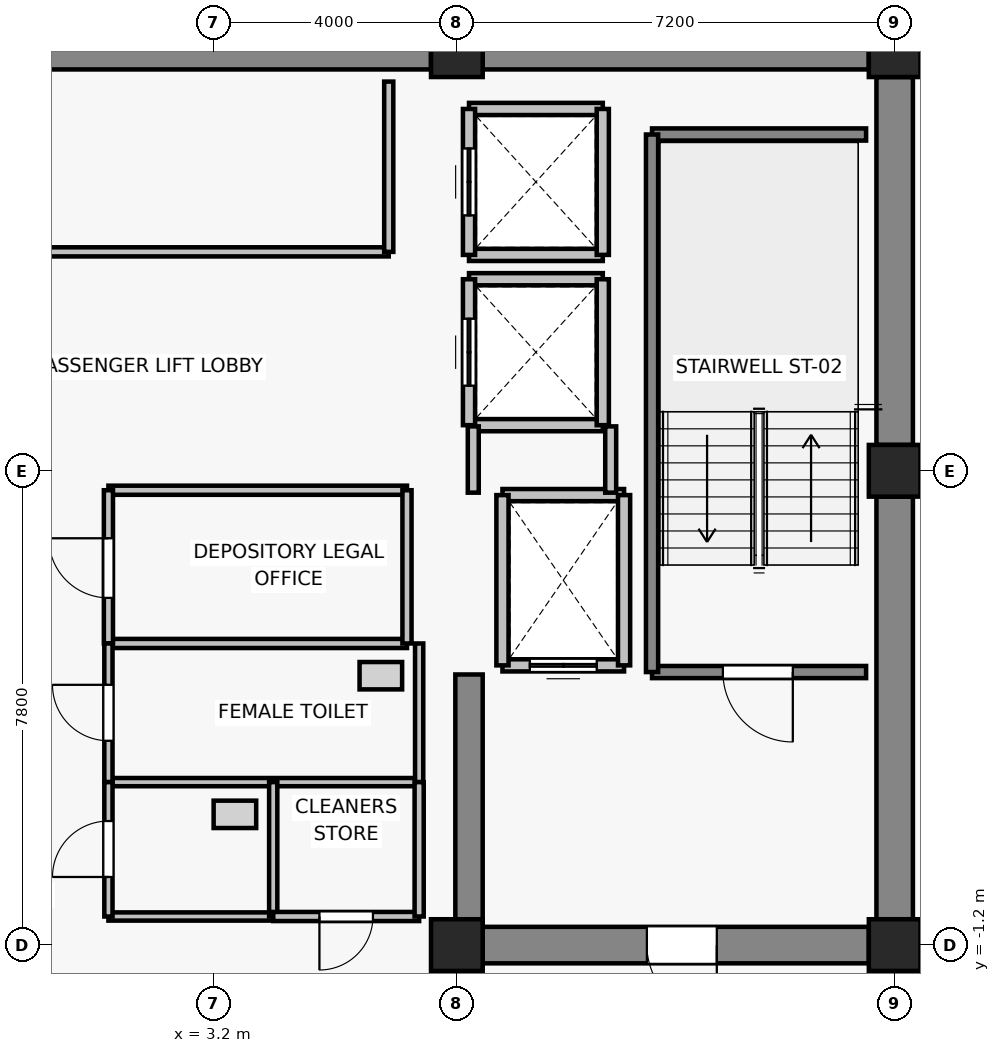
"""IFC4 building model, lengths in metres.
Left out: names, types, materials, properties, quantities, classifications, styles, units other than length and angle.
Written with IfcOpenShell. Run it as: python <this file> out.ifc"""

import sys

from ifc_helpers import new_model, si_unit, direction, frame, frame_2d, origin, origin_2d, place, context, subcontext, project, spatial, rectangle, extrude, source, transform, mapped, element, fill, save


model = new_model("IFC4")
c1 = context("Model", 3, precision=1e-05, world=origin(), true_north=direction((0.0, 1.0)))
c2 = subcontext(c1, "Body", "Model", "MODEL_VIEW")
j1 = project(units=[si_unit("LENGTHUNIT", "METRE"), si_unit("PLANEANGLEUNIT", "RADIAN")], contexts=[c1])
p1 = place(None, origin())
s1 = spatial("IfcSite", under=j1, at=p1, CompositionType="ELEMENT")
p2 = place(p1, origin())
s2 = spatial("IfcBuilding", under=s1, at=p2, CompositionType="ELEMENT")
p3 = place(p2, frame((0.0, 0.0, 255.1)))
s3 = spatial("IfcBuildingStorey", under=s2, at=p3, CompositionType="ELEMENT", Elevation=255.1)
for number, where, z_axis, x_axis in (
    (1, (7.2, -1.2, 0.0), (0.0, 0.0, 1.0), (1.0, 0.0, 0.0)),
    (2, (14.4, -1.2, 0.0), (0.0, 0.0, 1.0), (1.0, 0.0, 0.0)),
    (3, (14.4, 6.6, 0.0), (0.0, 0.0, 1.0), (1.0, 0.0, 0.0)),
    (4, (7.2, 13.5, 0.0), (0.0, 0.0, 1.0), (1.0, 0.0, 0.0)),
    (5, (14.4, 13.5, 0.0), (0.0, 0.0, 1.0), (1.0, 0.0, 0.0)),
):
    element("IfcColumn", number, at=place(p3, frame(where, z_axis=z_axis, x_axis=x_axis)), inside=s3, PredefinedType="COLUMN", context=c2, shape_type="SweptSolid", body=[
        extrude(rectangle(XDim=0.85, YDim=0.85, at=origin_2d()), origin(), (0.0, 0.0, 1.0), 3.3),
    ])
p4 = place(p3, frame((-6.775, 13.5, 0.0), z_axis=(0.0, 0.0, 1.0), x_axis=(1.0, 0.0, 0.0)))
e6 = element("IfcWall", 6, at=p4, inside=s3, PredefinedType="SHEAR", context=c2, shape_type="SweptSolid", body=[
    extrude(rectangle(XDim=13.55, YDim=0.6, at=frame_2d((6.775, 0.0))), origin(), (0.0, 0.0, 1.0), 3.075),
])
p5 = place(p3, frame((7.625, 13.5, 0.0), z_axis=(0.0, 0.0, 1.0), x_axis=(1.0, 0.0, 0.0)))
e7 = element("IfcWall", 7, at=p5, inside=s3, PredefinedType="SHEAR", context=c2, shape_type="SweptSolid", body=[
    extrude(rectangle(XDim=6.35, YDim=0.6, at=frame_2d((3.175, 0.0))), origin(), (0.0, 0.0, 1.0), 3.075),
])
p6 = place(p3, frame((14.4, -0.775, 0.0), z_axis=(0.0, 0.0, 1.0), x_axis=(0.0, 1.0, 0.0)))
e8 = element("IfcWall", 8, at=p6, inside=s3, PredefinedType="SHEAR", context=c2, shape_type="SweptSolid", body=[
    extrude(rectangle(XDim=6.95, YDim=0.6, at=frame_2d((3.475, 0.0))), origin(), (0.0, 0.0, 1.0), 3.075),
])
p7 = place(p3, frame((14.4, 7.025, 0.0), z_axis=(0.0, 0.0, 1.0), x_axis=(0.0, 1.0, 0.0)))
e9 = element("IfcWall", 9, at=p7, inside=s3, PredefinedType="SHEAR", context=c2, shape_type="SweptSolid", body=[
    extrude(rectangle(XDim=6.05, YDim=0.6, at=frame_2d((3.025, 0.0))), origin(), (0.0, 0.0, 1.0), 3.075),
])
p8 = place(p3, frame((13.975, -1.2, 0.0), z_axis=(0.0, 0.0, 1.0), x_axis=(-1.0, 0.0, 0.0)))
e10 = element("IfcWall", 10, at=p8, inside=s3, PredefinedType="SHEAR", context=c2, shape_type="SweptSolid", body=[
    extrude(rectangle(XDim=6.35, YDim=0.6, at=frame_2d((3.175, 0.0))), origin(), (0.0, 0.0, 1.0), 3.075),
])
p9 = place(p8, frame((2.5, 0.0, 0.0)))
e11 = element("IfcOpeningElement", 11, at=p9, cuts=e10, PredefinedType="OPENING", context=c2, shape_type="SweptSolid", body=[
    extrude(rectangle(XDim=1.15, YDim=2.15, at=frame_2d((0.575, 1.075))), frame((0.0, 0.31, 0.0), z_axis=(0.0, -1.0, 0.0), x_axis=(1.0, 0.0, 0.0)), (0.0, 0.0, 1.0), 0.62),
])
p10 = place(p3, frame((7.4, -0.9, 0.0), z_axis=(0.0, 0.0, 1.0), x_axis=(0.0, 1.0, 0.0)))
e12 = element("IfcWall", 12, at=p10, inside=s3, PredefinedType="SHEAR", context=c2, shape_type="SweptSolid", body=[
    extrude(rectangle(XDim=4.15, YDim=0.45, at=frame_2d((2.075, 0.0))), origin(), (0.0, 0.0, 1.0), 3.075),
])
p11 = place(p3, frame((9.95, 3.4, 0.0), z_axis=(0.0, 0.0, 1.0), x_axis=(-1.0, 0.0, 0.0)))
e13 = element("IfcWall", 13, at=p11, inside=s3, PredefinedType="SOLIDWALL", context=c2, shape_type="SweptSolid", body=[
    extrude(rectangle(XDim=2.0, YDim=0.2, at=frame_2d((1.0, 0.0))), origin(), (0.0, 0.0, 1.0), 3.075),
])
p12 = place(p11, frame((0.45, 0.0, 0.0)))
e14 = element("IfcOpeningElement", 14, at=p12, cuts=e13, PredefinedType="OPENING", context=c2, shape_type="SweptSolid", body=[
    extrude(rectangle(XDim=1.1, YDim=2.2, at=frame_2d((0.55, 1.1))), frame((0.0, 0.11, 0.0), z_axis=(0.0, -1.0, 0.0), x_axis=(1.0, 0.0, 0.0)), (0.0, 0.0, 1.0), 0.22),
])
p13 = place(p3, frame((7.95, 6.2, 0.0), z_axis=(0.0, 0.0, 1.0), x_axis=(1.0, 0.0, 0.0)))
e15 = element("IfcWall", 15, at=p13, inside=s3, PredefinedType="SOLIDWALL", context=c2, shape_type="SweptSolid", body=[
    extrude(rectangle(XDim=2.0, YDim=0.2, at=frame_2d((1.0, 0.0))), origin(), (0.0, 0.0, 1.0), 3.075),
])
for number, where, z_axis, x_axis in (
    (16, (7.95, 3.4, 0.0), (0.0, 0.0, 1.0), (0.0, 1.0, 0.0)),
    (17, (9.95, 6.2, 0.0), (0.0, 0.0, 1.0), (0.0, -1.0, 0.0)),
):
    element("IfcWall", number, at=place(p3, frame(where, z_axis=z_axis, x_axis=x_axis)), inside=s3, PredefinedType="SOLIDWALL", context=c2, shape_type="SweptSolid", body=[
        extrude(rectangle(XDim=2.8, YDim=0.2, at=frame_2d((1.4, 0.0))), origin(), (0.0, 0.0, 1.0), 3.075),
    ])
for number, where, z_axis, x_axis in (
    (18, (9.6, 7.35, 0.0), (0.0, 0.0, 1.0), (-1.0, 0.0, 0.0)),
    (19, (7.4, 9.75, 0.0), (0.0, 0.0, 1.0), (1.0, 0.0, 0.0)),
):
    element("IfcWall", number, at=place(p3, frame(where, z_axis=z_axis, x_axis=x_axis)), inside=s3, PredefinedType="SOLIDWALL", context=c2, shape_type="SweptSolid", body=[
        extrude(rectangle(XDim=2.2, YDim=0.2, at=frame_2d((1.1, 0.0))), origin(), (0.0, 0.0, 1.0), 2.615),
    ])
p14 = place(p3, frame((7.4, 7.35, 0.0), z_axis=(0.0, 0.0, 1.0), x_axis=(0.0, 1.0, 0.0)))
e20 = element("IfcWall", 20, at=p14, inside=s3, PredefinedType="SOLIDWALL", context=c2, shape_type="SweptSolid", body=[
    extrude(rectangle(XDim=2.4, YDim=0.2, at=frame_2d((1.2, 0.0))), origin(), (0.0, 0.0, 1.0), 2.615),
])
p15 = place(p14, frame((0.65, 0.0, 0.0)))
e21 = element("IfcOpeningElement", 21, at=p15, cuts=e20, PredefinedType="OPENING", context=c2, shape_type="SweptSolid", body=[
    extrude(rectangle(XDim=1.1, YDim=2.2, at=frame_2d((0.55, 1.1))), frame((0.0, 0.11, 0.0), z_axis=(0.0, -1.0, 0.0), x_axis=(1.0, 0.0, 0.0)), (0.0, 0.0, 1.0), 0.22),
])
p16 = place(p3, frame((9.6, 9.75, 0.0), z_axis=(0.0, 0.0, 1.0), x_axis=(0.0, -1.0, 0.0)))
e22 = element("IfcWall", 22, at=p16, inside=s3, PredefinedType="SOLIDWALL", context=c2, shape_type="SweptSolid", body=[
    extrude(rectangle(XDim=2.4, YDim=0.2, at=frame_2d((1.2, 0.0))), origin(), (0.0, 0.0, 1.0), 3.075),
])
for number, where, z_axis, x_axis in (
    (23, (9.6, 10.15, 0.0), (0.0, 0.0, 1.0), (-1.0, 0.0, 0.0)),
    (24, (7.4, 12.55, 0.0), (0.0, 0.0, 1.0), (1.0, 0.0, 0.0)),
):
    element("IfcWall", number, at=place(p3, frame(where, z_axis=z_axis, x_axis=x_axis)), inside=s3, PredefinedType="SOLIDWALL", context=c2, shape_type="SweptSolid", body=[
        extrude(rectangle(XDim=2.2, YDim=0.2, at=frame_2d((1.1, 0.0))), origin(), (0.0, 0.0, 1.0), 2.615),
    ])
p17 = place(p3, frame((7.4, 10.15, 0.0), z_axis=(0.0, 0.0, 1.0), x_axis=(0.0, 1.0, 0.0)))
e25 = element("IfcWall", 25, at=p17, inside=s3, PredefinedType="SOLIDWALL", context=c2, shape_type="SweptSolid", body=[
    extrude(rectangle(XDim=2.4, YDim=0.2, at=frame_2d((1.2, 0.0))), origin(), (0.0, 0.0, 1.0), 2.615),
])
p18 = place(p17, frame((0.65, 0.0, 0.0)))
e26 = element("IfcOpeningElement", 26, at=p18, cuts=e25, PredefinedType="OPENING", context=c2, shape_type="SweptSolid", body=[
    extrude(rectangle(XDim=1.1, YDim=2.2, at=frame_2d((0.55, 1.1))), frame((0.0, 0.11, 0.0), z_axis=(0.0, -1.0, 0.0), x_axis=(1.0, 0.0, 0.0)), (0.0, 0.0, 1.0), 0.22),
])
p19 = place(p3, frame((9.6, 12.55, 0.0), z_axis=(0.0, 0.0, 1.0), x_axis=(0.0, -1.0, 0.0)))
e27 = element("IfcWall", 27, at=p19, inside=s3, PredefinedType="SOLIDWALL", context=c2, shape_type="SweptSolid", body=[
    extrude(rectangle(XDim=2.4, YDim=0.2, at=frame_2d((1.2, 0.0))), origin(), (0.0, 0.0, 1.0), 3.075),
])
p20 = place(p3, frame((13.93, 3.29, 0.0), z_axis=(0.0, 0.0, 1.0), x_axis=(-1.0, 0.0, 0.0)))
e28 = element("IfcWall", 28, at=p20, inside=s3, PredefinedType="SOLIDWALL", context=c2, shape_type="SweptSolid", body=[
    extrude(rectangle(XDim=3.52, YDim=0.2, at=frame_2d((1.76, 0.0))), origin(), (0.0, 0.0, 1.0), 3.075),
])
p21 = place(p20, frame((1.205, 0.0, 0.0)))
e29 = element("IfcOpeningElement", 29, at=p21, cuts=e28, PredefinedType="OPENING", context=c2, shape_type="SweptSolid", body=[
    extrude(rectangle(XDim=1.15, YDim=2.15, at=frame_2d((0.575, 1.075))), frame((0.0, 0.11, 0.0), z_axis=(0.0, -1.0, 0.0), x_axis=(1.0, 0.0, 0.0)), (0.0, 0.0, 1.0), 0.22),
])
p22 = place(p3, frame((10.41, 12.13, 0.0), z_axis=(0.0, 0.0, 1.0), x_axis=(1.0, 0.0, 0.0)))
e30 = element("IfcWall", 30, at=p22, inside=s3, PredefinedType="SOLIDWALL", context=c2, shape_type="SweptSolid", body=[
    extrude(rectangle(XDim=3.52, YDim=0.2, at=frame_2d((1.76, 0.0))), origin(), (0.0, 0.0, 1.0), 3.075),
])
p23 = place(p3, frame((10.41, 3.29, 0.0), z_axis=(0.0, 0.0, 1.0), x_axis=(0.0, 1.0, 0.0)))
e31 = element("IfcWall", 31, at=p23, inside=s3, PredefinedType="SOLIDWALL", context=c2, shape_type="SweptSolid", body=[
    extrude(rectangle(XDim=8.84, YDim=0.2, at=frame_2d((4.42, 0.0))), origin(), (0.0, 0.0, 1.0), 3.075),
])
p24 = place(p3, frame((7.47, 6.24, 0.0), z_axis=(0.0, 0.0, 1.0), x_axis=(0.0, 1.0, 0.0)))
e32 = element("IfcWall", 32, at=p24, inside=s3, PredefinedType="PARTITIONING", context=c2, shape_type="SweptSolid", body=[
    extrude(rectangle(XDim=1.09, YDim=0.18, at=frame_2d((0.545, 0.0))), origin(), (0.0, 0.0, 1.0), 2.615),
])
p25 = place(p3, frame((9.73, 7.33, 0.0), z_axis=(0.0, 0.0, 1.0), x_axis=(0.0, -1.0, 0.0)))
e33 = element("IfcWall", 33, at=p25, inside=s3, PredefinedType="PARTITIONING", context=c2, shape_type="SweptSolid", body=[
    extrude(rectangle(XDim=1.09, YDim=0.18, at=frame_2d((0.545, 0.0))), origin(), (0.0, 0.0, 1.0), 3.075),
])
p26 = place(p3, frame((6.08, 10.2, 0.0), z_axis=(0.0, 0.0, 1.0), x_axis=(-1.0, 0.0, 0.0)))
e34 = element("IfcWall", 34, at=p26, inside=s3, PredefinedType="PARTITIONING", context=c2, shape_type="SweptSolid", body=[
    extrude(rectangle(XDim=12.16, YDim=0.15, at=frame_2d((6.08, 0.0))), origin(), (0.0, 0.0, 1.0), 3.075),
])
p27 = place(p26, frame((7.005, 0.0, 0.0)))
e35 = element("IfcOpeningElement", 35, at=p27, cuts=e34, PredefinedType="OPENING", context=c2, shape_type="SweptSolid", body=[
    extrude(rectangle(XDim=1.15, YDim=2.15, at=frame_2d((0.575, 1.075))), frame((0.0, 0.085, 0.0), z_axis=(0.0, -1.0, 0.0), x_axis=(1.0, 0.0, 0.0)), (0.0, 0.0, 1.0), 0.17),
])
p28 = place(p3, frame((6.08, 13.0, 0.0), z_axis=(0.0, 0.0, 1.0), x_axis=(0.0, -1.0, 0.0)))
e36 = element("IfcWall", 36, at=p28, inside=s3, PredefinedType="PARTITIONING", context=c2, shape_type="SweptSolid", body=[
    extrude(rectangle(XDim=2.8, YDim=0.15, at=frame_2d((1.4, 0.0))), origin(), (0.0, 0.0, 1.0), 3.075),
])
for number, where, z_axis, x_axis in (
    (37, (6.38, 3.76, 0.0), (0.0, 0.0, 1.0), (-1.0, 0.0, 0.0)),
    (38, (1.47, 6.28, 0.0), (0.0, 0.0, 1.0), (1.0, 0.0, 0.0)),
):
    element("IfcWall", number, at=place(p3, frame(where, z_axis=z_axis, x_axis=x_axis)), inside=s3, PredefinedType="PARTITIONING", context=c2, shape_type="SweptSolid", body=[
        extrude(rectangle(XDim=4.91, YDim=0.15, at=frame_2d((2.455, 0.0))), origin(), (0.0, 0.0, 1.0), 3.075),
    ])
p29 = place(p3, frame((1.47, 3.76, 0.0), z_axis=(0.0, 0.0, 1.0), x_axis=(0.0, 1.0, 0.0)))
e39 = element("IfcWall", 39, at=p29, inside=s3, PredefinedType="PARTITIONING", context=c2, shape_type="SweptSolid", body=[
    extrude(rectangle(XDim=2.52, YDim=0.15, at=frame_2d((1.26, 0.0))), origin(), (0.0, 0.0, 1.0), 3.075),
])
p30 = place(p29, frame((0.75, 0.0, 0.0)))
e40 = element("IfcOpeningElement", 40, at=p30, cuts=e39, PredefinedType="OPENING", context=c2, shape_type="SweptSolid", body=[
    extrude(rectangle(XDim=0.98, YDim=2.15, at=frame_2d((0.49, 1.075))), frame((0.0, 0.085, 0.0), z_axis=(0.0, -1.0, 0.0), x_axis=(1.0, 0.0, 0.0)), (0.0, 0.0, 1.0), 0.17),
])
p31 = place(p3, frame((6.38, 6.28, 0.0), z_axis=(0.0, 0.0, 1.0), x_axis=(0.0, -1.0, 0.0)))
e41 = element("IfcWall", 41, at=p31, inside=s3, PredefinedType="PARTITIONING", context=c2, shape_type="SweptSolid", body=[
    extrude(rectangle(XDim=2.52, YDim=0.15, at=frame_2d((1.26, 0.0))), origin(), (0.0, 0.0, 1.0), 3.075),
])
p32 = place(p3, frame((6.58, 1.48, 0.0), z_axis=(0.0, 0.0, 1.0), x_axis=(-1.0, 0.0, 0.0)))
e42 = element("IfcWall", 42, at=p32, inside=s3, PredefinedType="PARTITIONING", context=c2, shape_type="SweptSolid", body=[
    extrude(rectangle(XDim=5.11, YDim=0.135, at=frame_2d((2.555, 0.0))), origin(), (0.0, 0.0, 1.0), 3.075),
])
p33 = place(p3, frame((1.47, 1.48, 0.0), z_axis=(0.0, 0.0, 1.0), x_axis=(0.0, 1.0, 0.0)))
e43 = element("IfcWall", 43, at=p33, inside=s3, PredefinedType="PARTITIONING", context=c2, shape_type="SweptSolid", body=[
    extrude(rectangle(XDim=2.28, YDim=0.135, at=frame_2d((1.14, 0.0))), origin(), (0.0, 0.0, 1.0), 3.075),
])
p34 = place(p33, frame((0.68, 0.0, 0.0)))
e44 = element("IfcOpeningElement", 44, at=p34, cuts=e43, PredefinedType="OPENING", context=c2, shape_type="SweptSolid", body=[
    extrude(rectangle(XDim=0.92, YDim=2.1, at=frame_2d((0.46, 1.05))), frame((0.0, 0.077, 0.0), z_axis=(0.0, -1.0, 0.0), x_axis=(1.0, 0.0, 0.0)), (0.0, 0.0, 1.0), 0.155),
])
p35 = place(p3, frame((6.58, 3.76, 0.0), z_axis=(0.0, 0.0, 1.0), x_axis=(0.0, -1.0, 0.0)))
e45 = element("IfcWall", 45, at=p35, inside=s3, PredefinedType="PARTITIONING", context=c2, shape_type="SweptSolid", body=[
    extrude(rectangle(XDim=2.28, YDim=0.135, at=frame_2d((1.14, 0.0))), origin(), (0.0, 0.0, 1.0), 3.075),
])
p36 = place(p3, frame((4.18, -0.73, 0.0), z_axis=(0.0, 0.0, 1.0), x_axis=(-1.0, 0.0, 0.0)))
e46 = element("IfcWall", 46, at=p36, inside=s3, PredefinedType="PARTITIONING", context=c2, shape_type="SweptSolid", body=[
    extrude(rectangle(XDim=2.71, YDim=0.135, at=frame_2d((1.355, 0.0))), origin(), (0.0, 0.0, 1.0), 3.075),
])
p37 = place(p3, frame((1.47, -0.73, 0.0), z_axis=(0.0, 0.0, 1.0), x_axis=(0.0, 1.0, 0.0)))
e47 = element("IfcWall", 47, at=p37, inside=s3, PredefinedType="PARTITIONING", context=c2, shape_type="SweptSolid", body=[
    extrude(rectangle(XDim=2.21, YDim=0.135, at=frame_2d((1.105, 0.0))), origin(), (0.0, 0.0, 1.0), 3.075),
])
p38 = place(p37, frame((0.65, 0.0, 0.0)))
e48 = element("IfcOpeningElement", 48, at=p38, cuts=e47, PredefinedType="OPENING", context=c2, shape_type="SweptSolid", body=[
    extrude(rectangle(XDim=0.92, YDim=2.1, at=frame_2d((0.46, 1.05))), frame((0.0, 0.077, 0.0), z_axis=(0.0, -1.0, 0.0), x_axis=(1.0, 0.0, 0.0)), (0.0, 0.0, 1.0), 0.155),
])
p39 = place(p3, frame((4.18, 1.48, 0.0), z_axis=(0.0, 0.0, 1.0), x_axis=(0.0, -1.0, 0.0)))
e49 = element("IfcWall", 49, at=p39, inside=s3, PredefinedType="PARTITIONING", context=c2, shape_type="SweptSolid", body=[
    extrude(rectangle(XDim=2.21, YDim=0.135, at=frame_2d((1.105, 0.0))), origin(), (0.0, 0.0, 1.0), 3.075),
])
p40 = place(p3, frame((6.58, -0.73, 0.0), z_axis=(0.0, 0.0, 1.0), x_axis=(-1.0, 0.0, 0.0)))
e50 = element("IfcWall", 50, at=p40, inside=s3, PredefinedType="PARTITIONING", context=c2, shape_type="SweptSolid", body=[
    extrude(rectangle(XDim=2.4, YDim=0.15, at=frame_2d((1.2, 0.0))), origin(), (0.0, 0.0, 1.0), 3.075),
])
p41 = place(p40, frame((0.76, 0.0, 0.0)))
e51 = element("IfcOpeningElement", 51, at=p41, cuts=e50, PredefinedType="OPENING", context=c2, shape_type="SweptSolid", body=[
    extrude(rectangle(XDim=0.88, YDim=2.1, at=frame_2d((0.44, 1.05))), frame((0.0, 0.085, 0.0), z_axis=(0.0, -1.0, 0.0), x_axis=(1.0, 0.0, 0.0)), (0.0, 0.0, 1.0), 0.17),
])
p42 = place(p3, frame((6.58, 1.48, 0.0), z_axis=(0.0, 0.0, 1.0), x_axis=(0.0, -1.0, 0.0)))
e52 = element("IfcWall", 52, at=p42, inside=s3, PredefinedType="PARTITIONING", context=c2, shape_type="SweptSolid", body=[
    extrude(rectangle(XDim=2.21, YDim=0.15, at=frame_2d((1.105, 0.0))), origin(), (0.0, 0.0, 1.0), 3.075),
])
m1 = source(origin(), c2, "Body", "SweptSolid", [
    extrude(rectangle(XDim=1.1, YDim=2.2, at=frame_2d((0.55, 1.1))), frame((0.0, 0.025, 0.0), z_axis=(0.0, -1.0, 0.0), x_axis=(1.0, 0.0, 0.0)), (0.0, 0.0, 1.0), 0.05),
])
p43 = place(p12, origin())
e53 = element("IfcDoor", 53, at=p43, inside=s3, OperationType="DOUBLE_DOOR_SLIDING", PredefinedType="DOOR", context=c2, shape_type="MappedRepresentation", body=[
    mapped(m1, transform((0.0, 0.0, 0.0), x_axis=(1.0, 0.0, 0.0), y_axis=(0.0, 1.0, 0.0), z_axis=(0.0, 0.0, 1.0), scale=1.0)),
])
fill(e14, e53)
p44 = place(p15, origin())
e54 = element("IfcDoor", 54, at=p44, inside=s3, OperationType="DOUBLE_DOOR_SLIDING", PredefinedType="DOOR", context=c2, shape_type="MappedRepresentation", body=[
    mapped(m1, transform((0.0, 0.0, 0.0), x_axis=(1.0, 0.0, 0.0), y_axis=(0.0, 1.0, 0.0), z_axis=(0.0, 0.0, 1.0), scale=1.0)),
])
fill(e21, e54)
p45 = place(p18, origin())
e55 = element("IfcDoor", 55, at=p45, inside=s3, OperationType="DOUBLE_DOOR_SLIDING", PredefinedType="DOOR", context=c2, shape_type="MappedRepresentation", body=[
    mapped(m1, transform((0.0, 0.0, 0.0), x_axis=(1.0, 0.0, 0.0), y_axis=(0.0, 1.0, 0.0), z_axis=(0.0, 0.0, 1.0), scale=1.0)),
])
fill(e26, e55)
m2 = source(origin(), c2, "Body", "SweptSolid", [
    extrude(rectangle(XDim=1.15, YDim=2.15, at=frame_2d((0.575, 1.075))), frame((0.0, 0.025, 0.0), z_axis=(0.0, -1.0, 0.0), x_axis=(1.0, 0.0, 0.0)), (0.0, 0.0, 1.0), 0.05),
])
p46 = place(p21, origin())
e56 = element("IfcDoor", 56, at=p46, inside=s3, OperationType="SINGLE_SWING_LEFT", PredefinedType="DOOR", context=c2, shape_type="MappedRepresentation", body=[
    mapped(m2, transform((0.0, 0.0, 0.0), x_axis=(1.0, 0.0, 0.0), y_axis=(0.0, 1.0, 0.0), z_axis=(0.0, 0.0, 1.0), scale=1.0)),
])
fill(e29, e56)
p47 = place(p9, origin())
e57 = element("IfcDoor", 57, at=p47, inside=s3, OperationType="SINGLE_SWING_LEFT", PredefinedType="DOOR", context=c2, shape_type="MappedRepresentation", body=[
    mapped(m2, transform((0.0, 0.0, 0.0), x_axis=(1.0, 0.0, 0.0), y_axis=(0.0, 1.0, 0.0), z_axis=(0.0, 0.0, 1.0), scale=1.0)),
])
fill(e11, e57)
m3 = source(origin(), c2, "Body", "SweptSolid", [
    extrude(rectangle(XDim=0.98, YDim=2.15, at=frame_2d((0.49, 1.075))), frame((0.0, 0.025, 0.0), z_axis=(0.0, -1.0, 0.0), x_axis=(1.0, 0.0, 0.0)), (0.0, 0.0, 1.0), 0.05),
])
p48 = place(p30, origin())
e58 = element("IfcDoor", 58, at=p48, inside=s3, OperationType="SINGLE_SWING_RIGHT", PredefinedType="DOOR", context=c2, shape_type="MappedRepresentation", body=[
    mapped(m3, transform((0.0, 0.0, 0.0), x_axis=(1.0, 0.0, 0.0), y_axis=(0.0, 1.0, 0.0), z_axis=(0.0, 0.0, 1.0), scale=1.0)),
])
fill(e40, e58)
m4 = source(origin(), c2, "Body", "SweptSolid", [
    extrude(rectangle(XDim=0.92, YDim=2.1, at=frame_2d((0.46, 1.05))), frame((0.0, 0.025, 0.0), z_axis=(0.0, -1.0, 0.0), x_axis=(1.0, 0.0, 0.0)), (0.0, 0.0, 1.0), 0.05),
])
p49 = place(p34, origin())
e59 = element("IfcDoor", 59, at=p49, inside=s3, OperationType="SINGLE_SWING_RIGHT", PredefinedType="DOOR", context=c2, shape_type="MappedRepresentation", body=[
    mapped(m4, transform((0.0, 0.0, 0.0), x_axis=(1.0, 0.0, 0.0), y_axis=(0.0, 1.0, 0.0), z_axis=(0.0, 0.0, 1.0), scale=1.0)),
])
fill(e44, e59)
p50 = place(p38, origin())
e60 = element("IfcDoor", 60, at=p50, inside=s3, OperationType="SINGLE_SWING_LEFT", PredefinedType="DOOR", context=c2, shape_type="MappedRepresentation", body=[
    mapped(m4, transform((0.0, 0.0, 0.0), x_axis=(1.0, 0.0, 0.0), y_axis=(0.0, 1.0, 0.0), z_axis=(0.0, 0.0, 1.0), scale=1.0)),
])
fill(e48, e60)
m5 = source(origin(), c2, "Body", "SweptSolid", [
    extrude(rectangle(XDim=0.88, YDim=2.1, at=frame_2d((0.44, 1.05))), frame((0.0, 0.025, 0.0), z_axis=(0.0, -1.0, 0.0), x_axis=(1.0, 0.0, 0.0)), (0.0, 0.0, 1.0), 0.05),
])
p51 = place(p41, origin())
e61 = element("IfcDoor", 61, at=p51, inside=s3, OperationType="SINGLE_SWING_RIGHT", PredefinedType="DOOR", context=c2, shape_type="MappedRepresentation", body=[
    mapped(m5, transform((0.0, 0.0, 0.0), x_axis=(1.0, 0.0, 0.0), y_axis=(0.0, 1.0, 0.0), z_axis=(0.0, 0.0, 1.0), scale=1.0)),
])
fill(e51, e61)
save(model, sys.argv[1])
